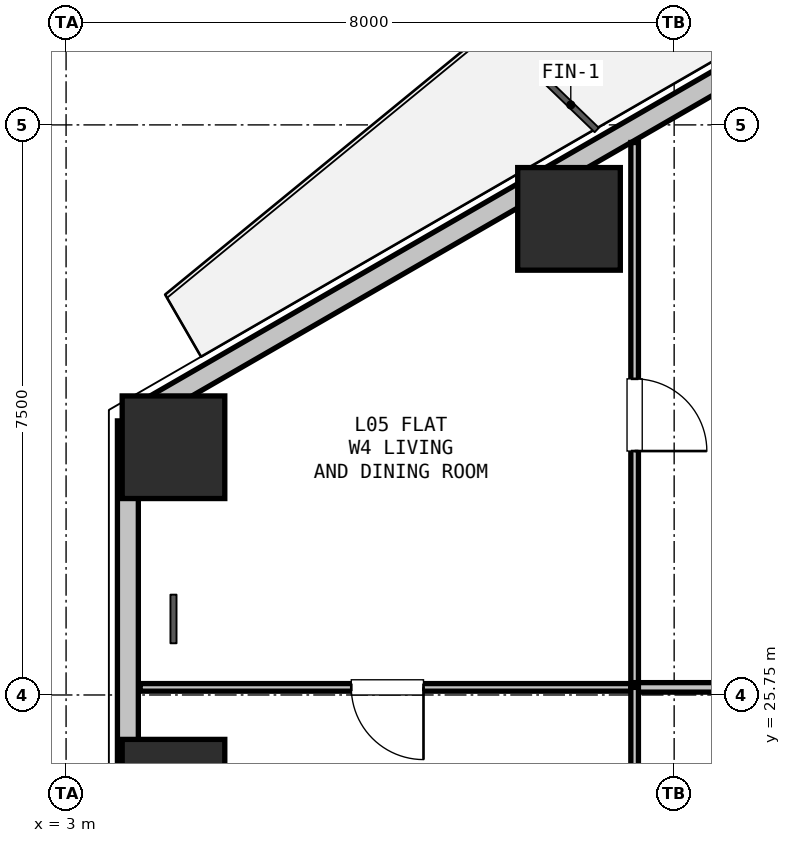
"""IFC4 building model, lengths in metres.
Left out: names, types, materials, properties, quantities, classifications, styles, units other than length and angle.
Written with IfcOpenShell. Run it as: python <this file> out.ifc"""

import sys

from ifc_helpers import new_model, si_unit, direction, frame, frame_2d, origin, origin_2d, place, context, subcontext, project, spatial, rectangle, hollow_rectangle, extrude, element, fill, save


model = new_model("IFC4")
c1 = context("Model", 3, precision=1e-05, world=origin(), true_north=direction((0.0, 1.0)))
c2 = subcontext(c1, "Body", "Model", "MODEL_VIEW")
j1 = project(units=[si_unit("LENGTHUNIT", "METRE"), si_unit("PLANEANGLEUNIT", "RADIAN")], contexts=[c1])
p1 = place(None, origin())
s1 = spatial("IfcSite", under=j1, at=p1, CompositionType="ELEMENT")
p2 = place(p1, origin())
s2 = spatial("IfcBuilding", under=s1, at=p2, CompositionType="ELEMENT")
p3 = place(p2, frame((0.0, 0.0, 22.5)))
s3 = spatial("IfcBuildingStorey", under=s2, at=p3, CompositionType="ELEMENT", Elevation=22.5)
for number, where, z_axis, x_axis in (
    (1, (4.413, 29.009, 0.0), (0.0, 0.0, 1.0), (1.0, 0.0, 0.0)),
    (2, (9.617, 32.014, 0.0), (0.0, 0.0, 1.0), (1.0, 0.0, 0.0)),
    (3, (4.413, 24.491, 0.0), (0.0, 0.0, 1.0), (1.0, 0.0, 0.0)),
):
    element("IfcColumn", number, at=place(p3, frame(where, z_axis=z_axis, x_axis=x_axis)), inside=s3, PredefinedType="COLUMN", context=c2, shape_type="SweptSolid", body=[
        extrude(hollow_rectangle(XDim=1.35, YDim=1.35, WallThickness=0.036, at=origin_2d()), origin(), (0.0, 0.0, 1.0), 3.3),
    ])
p4 = place(p3, frame((3.813, 24.144, 0.0), z_axis=(0.0, 0.0, 1.0), x_axis=(0.0, 1.0, 0.0)))
e4 = element("IfcWall", 4, at=p4, inside=s3, PredefinedType="SOLIDWALL", context=c2, shape_type="SweptSolid", body=[
    extrude(rectangle(XDim=5.211, YDim=0.275, at=frame_2d((2.606, 0.0))), origin(), (0.0, 0.0, 1.0), 2.66),
])
p5 = place(p3, frame((3.943, 29.431, 0.0), z_axis=(0.0, 0.0, 1.0), x_axis=(0.866027105532, 0.499997052475, 0.0)))
e5 = element("IfcWall", 5, at=p5, inside=s3, PredefinedType="SOLIDWALL", context=c2, shape_type="SweptSolid", body=[
    extrude(rectangle(XDim=12.673, YDim=0.275, at=frame_2d((6.336, 0.0))), origin(), (0.0, 0.0, 1.0), 2.66),
])
p6 = place(p5, frame((9.298, 0.0, 0.0)))
e6 = element("IfcOpeningElement", 6, at=p6, cuts=e5, PredefinedType="OPENING", context=c2, shape_type="SweptSolid", body=[
    extrude(rectangle(XDim=1.0, YDim=2.1, at=frame_2d((0.5, 1.05))), frame((0.0, 0.147, 0.0), z_axis=(0.0, -1.0, 0.0), x_axis=(1.0, 0.0, 0.0)), (0.0, 0.0, 1.0), 0.295),
])
p7 = place(p3, frame((10.48, 25.85, 0.0), z_axis=(0.0, 0.0, 1.0), x_axis=(-1.0, 0.0, 0.0)))
e7 = element("IfcWall", 7, at=p7, inside=s3, PredefinedType="PARTITIONING", context=c2, shape_type="SweptSolid", body=[
    extrude(rectangle(XDim=6.505, YDim=0.1, at=frame_2d((3.253, 0.0))), origin(), (0.0, 0.0, 1.0), 2.65),
])
p8 = place(p7, frame((2.778, 0.0, 0.0)))
e8 = element("IfcOpeningElement", 8, at=p8, cuts=e7, PredefinedType="OPENING", context=c2, shape_type="SweptSolid", body=[
    extrude(rectangle(XDim=0.95, YDim=2.1, at=frame_2d((0.475, 1.05))), frame((0.0, 0.06, 0.0), z_axis=(0.0, -1.0, 0.0), x_axis=(1.0, 0.0, 0.0)), (0.0, 0.0, 1.0), 0.12),
])
p9 = place(p3, frame((3.813, 29.356, 0.0), z_axis=(0.0, 0.0, 1.0), x_axis=(0.866131372301, 0.499816412211, 0.0)))
e9 = element("IfcWall", 9, at=p9, inside=s3, PredefinedType="PARTITIONING", context=c2, shape_type="SweptSolid", body=[
    extrude(rectangle(XDim=0.15, YDim=0.125, at=frame_2d((0.075, 0.0))), origin(), (0.0, 0.0, 1.0), 3.04),
])
p10 = place(p3, frame((10.48, 33.018, 0.0), z_axis=(0.0, 0.0, 1.0), x_axis=(0.0, -1.0, 0.0)))
e10 = element("IfcWall", 10, at=p10, inside=s3, PredefinedType="PARTITIONING", context=c2, shape_type="SweptSolid", body=[
    extrude(rectangle(XDim=7.168, YDim=0.1, at=frame_2d((3.584, 0.0))), origin(), (0.0, 0.0, 1.0), 2.337),
])
p11 = place(p10, frame((3.109, 0.0, 0.0)))
e11 = element("IfcOpeningElement", 11, at=p11, cuts=e10, PredefinedType="OPENING", context=c2, shape_type="SweptSolid", body=[
    extrude(rectangle(XDim=0.95, YDim=2.1, at=frame_2d((0.475, 1.05))), frame((0.0, 0.06, 0.0), z_axis=(0.0, -1.0, 0.0), x_axis=(1.0, 0.0, 0.0)), (0.0, 0.0, 1.0), 0.12),
])
p12 = place(p3, frame((17.15, 25.85, 0.0), z_axis=(0.0, 0.0, 1.0), x_axis=(-1.0, 0.0, 0.0)))
e12 = element("IfcWall", 12, at=p12, inside=s3, PredefinedType="PARTITIONING", context=c2, shape_type="SweptSolid", body=[
    extrude(rectangle(XDim=6.67, YDim=0.125, at=frame_2d((3.335, 0.0))), origin(), (0.0, 0.0, 1.0), 3.04),
])
p13 = place(p12, frame((2.86, 0.0, 0.0)))
e13 = element("IfcOpeningElement", 13, at=p13, cuts=e12, PredefinedType="OPENING", context=c2, shape_type="SweptSolid", body=[
    extrude(rectangle(XDim=0.95, YDim=2.1, at=frame_2d((0.475, 1.05))), frame((0.0, 0.073, 0.0), z_axis=(0.0, -1.0, 0.0), x_axis=(1.0, 0.0, 0.0)), (0.0, 0.0, 1.0), 0.145),
])
p14 = place(p3, frame((10.48, 25.85, 0.0), z_axis=(0.0, 0.0, 1.0), x_axis=(0.0, -1.0, 0.0)))
e14 = element("IfcWall", 14, at=p14, inside=s3, PredefinedType="PARTITIONING", context=c2, shape_type="SweptSolid", body=[
    extrude(rectangle(XDim=5.368, YDim=0.1, at=frame_2d((2.684, 0.0))), origin(), (0.0, 0.0, 1.0), 2.337),
])
p15 = place(p14, frame((2.209, 0.0, 0.0)))
e15 = element("IfcOpeningElement", 15, at=p15, cuts=e14, PredefinedType="OPENING", context=c2, shape_type="SweptSolid", body=[
    extrude(rectangle(XDim=0.95, YDim=2.1, at=frame_2d((0.475, 1.05))), frame((0.0, 0.06, 0.0), z_axis=(0.0, -1.0, 0.0), x_axis=(1.0, 0.0, 0.0)), (0.0, 0.0, 1.0), 0.12),
])
p16 = place(p11, origin())
e16 = element("IfcDoor", 16, at=p16, inside=s3, OperationType="SINGLE_SWING_RIGHT", PredefinedType="DOOR", context=c2, shape_type="SweptSolid", body=[
    extrude(rectangle(XDim=0.95, YDim=2.1, at=frame_2d((0.475, 1.05))), frame((0.0, 0.025, 0.0), z_axis=(0.0, -1.0, 0.0), x_axis=(1.0, 0.0, 0.0)), (0.0, 0.0, 1.0), 0.05),
])
fill(e11, e16)
p17 = place(p8, origin())
e17 = element("IfcDoor", 17, at=p17, inside=s3, OperationType="SINGLE_SWING_LEFT", PredefinedType="DOOR", context=c2, shape_type="SweptSolid", body=[
    extrude(rectangle(XDim=0.95, YDim=2.1, at=frame_2d((0.475, 1.05))), frame((0.0, 0.025, 0.0), z_axis=(0.0, -1.0, 0.0), x_axis=(1.0, 0.0, 0.0)), (0.0, 0.0, 1.0), 0.05),
])
fill(e8, e17)
save(model, sys.argv[1])
